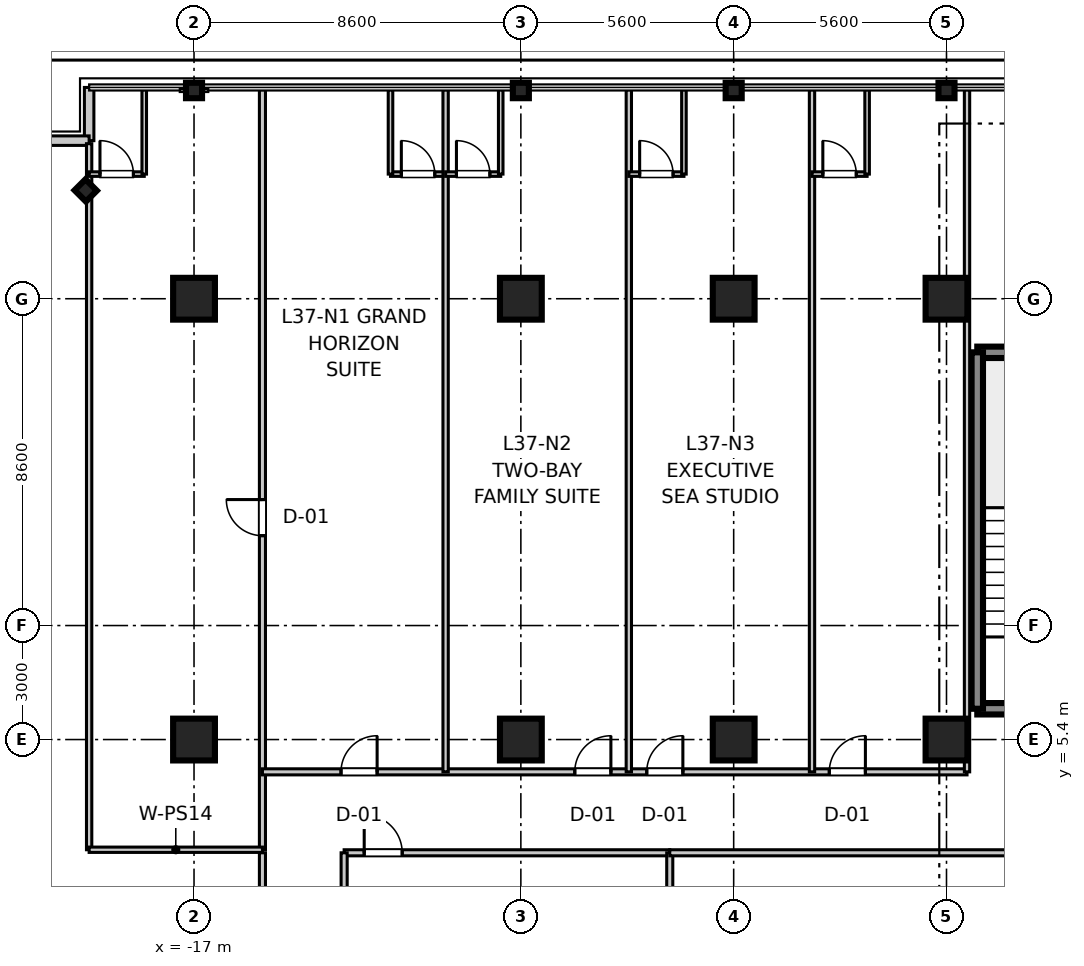
"""IFC4 building model, lengths in metres.
Left out: names, types, materials, properties, quantities, classifications, styles, units other than length and angle.
Written with IfcOpenShell. Run it as: python <this file> out.ifc"""

import sys

from ifc_helpers import new_model, si_unit, direction, frame, frame_2d, origin, origin_2d, place, context, subcontext, project, spatial, rectangle, i_section, extrude, source, transform, mapped, element, fill, save


model = new_model("IFC4")
c1 = context("Model", 3, precision=1e-05, world=origin(), true_north=direction((0.0, 1.0)))
c2 = subcontext(c1, "Body", "Model", "MODEL_VIEW")
j1 = project(units=[si_unit("LENGTHUNIT", "METRE"), si_unit("PLANEANGLEUNIT", "RADIAN")], contexts=[c1])
p1 = place(None, origin())
s1 = spatial("IfcSite", under=j1, at=p1, CompositionType="ELEMENT")
p2 = place(p1, origin())
s2 = spatial("IfcBuilding", under=s1, at=p2, CompositionType="ELEMENT")
p3 = place(p2, frame((0.0, 0.0, 149.0)))
s3 = spatial("IfcBuildingStorey", under=s2, at=p3, CompositionType="ELEMENT", Elevation=149.0)
m1 = source(origin(), c2, "Body", "SweptSolid", [
    extrude(rectangle(XDim=1.1, YDim=1.1, at=origin_2d()), origin(), (0.0, 0.0, 1.0), 3.605),
])
for number, where, z_axis, x_axis in (
    (1, (-17.0, 5.4, 0.0), (0.0, 0.0, 1.0), (1.0, 0.0, 0.0)),
    (2, (-17.0, 17.0, 0.0), (0.0, 0.0, 1.0), (1.0, 0.0, 0.0)),
    (3, (-8.4, 5.4, 0.0), (0.0, 0.0, 1.0), (1.0, 0.0, 0.0)),
    (4, (-8.4, 17.0, 0.0), (0.0, 0.0, 1.0), (1.0, 0.0, 0.0)),
    (5, (-2.8, 5.4, 0.0), (0.0, 0.0, 1.0), (1.0, 0.0, 0.0)),
    (6, (-2.8, 17.0, 0.0), (0.0, 0.0, 1.0), (1.0, 0.0, 0.0)),
    (7, (2.8, 5.4, 0.0), (0.0, 0.0, 1.0), (1.0, 0.0, 0.0)),
    (8, (2.8, 17.0, 0.0), (0.0, 0.0, 1.0), (1.0, 0.0, 0.0)),
):
    element("IfcColumn", number, at=place(p3, frame(where, z_axis=z_axis, x_axis=x_axis)), inside=s3, PredefinedType="COLUMN", context=c2, shape_type="MappedRepresentation", body=[
        mapped(m1, transform((0.0, 0.0, 0.0), scale=1.0)),
    ])
m2 = source(origin(), c2, "Body", "SweptSolid", [
    extrude(i_section(OverallWidth=0.406, OverallDepth=0.422, WebThickness=0.019, FlangeThickness=0.03, at=origin_2d()), origin(), (0.0, 0.0, 1.0), 3.605),
])
for number, where, z_axis, x_axis in (
    (9, (-17.0, 22.48, 0.0), (0.0, 0.0, 1.0), (0.0, 1.0, 0.0)),
    (10, (-8.4, 22.48, 0.0), (0.0, 0.0, 1.0), (0.0, 1.0, 0.0)),
    (11, (-2.8, 22.48, 0.0), (0.0, 0.0, 1.0), (0.0, 1.0, 0.0)),
    (12, (2.8, 22.48, 0.0), (0.0, 0.0, 1.0), (0.0, 1.0, 0.0)),
    (13, (-19.85, 19.85, 0.0), (0.0, 0.0, 1.0), (0.707, 0.707, 0.0)),
):
    element("IfcColumn", number, at=place(p3, frame(where, z_axis=z_axis, x_axis=x_axis)), inside=s3, PredefinedType="COLUMN", context=c2, shape_type="MappedRepresentation", body=[
        mapped(m2, transform((0.0, 0.0, 0.0), scale=1.0)),
    ])
m3 = source(origin(), c2, "Body", "SweptSolid", [
    extrude(rectangle(XDim=3.98, YDim=0.3, at=frame_2d((1.99, 0.0))), origin(), (0.0, 0.0, 1.0), 3.39),
])
for number, where, z_axis, x_axis in (
    (14, (3.61, 6.21, 0.0), (0.0, 0.0, 1.0), (1.0, 0.0, 0.0)),
    (15, (3.61, 15.59, 0.0), (0.0, 0.0, 1.0), (1.0, 0.0, 0.0)),
):
    element("IfcWall", number, at=place(p3, frame(where, z_axis=z_axis, x_axis=x_axis)), inside=s3, PredefinedType="SHEAR", context=c2, shape_type="MappedRepresentation", body=[
        mapped(m3, transform((0.0, 0.0, 0.0), scale=1.0)),
    ])
m4 = source(origin(), c2, "Body", "SweptSolid", [
    extrude(rectangle(XDim=9.38, YDim=0.3, at=frame_2d((4.69, 0.0))), origin(), (0.0, 0.0, 1.0), 3.39),
])
p4 = place(p3, frame((3.61, 6.21, 0.0), z_axis=(0.0, 0.0, 1.0), x_axis=(0.0, 1.0, 0.0)))
e16 = element("IfcWall", 16, at=p4, inside=s3, PredefinedType="SHEAR", context=c2, shape_type="MappedRepresentation", body=[
    mapped(m4, transform((0.0, 0.0, 0.0), scale=1.0)),
])
m5 = source(origin(), c2, "Body", "SweptSolid", [
    extrude(rectangle(XDim=1.4, YDim=0.25, at=frame_2d((0.7, 0.0))), origin(), (0.0, 0.0, 1.0), 3.39),
])
p5 = place(p3, frame((-19.76, 21.16, 0.0), z_axis=(0.0, 0.0, 1.0), x_axis=(0.0, 1.0, 0.0)))
e17 = element("IfcWall", 17, at=p5, inside=s3, PredefinedType="STANDARD", context=c2, shape_type="MappedRepresentation", body=[
    mapped(m5, transform((0.0, 0.0, 0.0), scale=1.0)),
])
m6 = source(origin(), c2, "Body", "SweptSolid", [
    extrude(rectangle(XDim=1.4, YDim=0.25, at=frame_2d((0.7, 0.0))), origin(), (0.0, 0.0, 1.0), 3.39),
])
p6 = place(p3, frame((-21.16, 21.16, 0.0), z_axis=(0.0, 0.0, 1.0), x_axis=(1.0, 0.0, 0.0)))
e18 = element("IfcWall", 18, at=p6, inside=s3, PredefinedType="STANDARD", context=c2, shape_type="MappedRepresentation", body=[
    mapped(m6, transform((0.0, 0.0, 0.0), scale=1.0)),
])
m7 = source(origin(), c2, "Body", "SweptSolid", [
    extrude(rectangle(XDim=20.0, YDim=0.16, at=frame_2d((10.0, 0.0))), origin(), (0.0, 0.0, 1.0), 2.73),
])
p7 = place(p3, frame((-15.2, 2.5, 0.0), z_axis=(0.0, 0.0, 1.0), x_axis=(0.0, 1.0, 0.0)))
e19 = element("IfcWall", 19, at=p7, inside=s3, PredefinedType="PARTITIONING", context=c2, shape_type="MappedRepresentation", body=[
    mapped(m7, transform((0.0, 0.0, 0.0), scale=1.0)),
])
p8 = place(p7, frame((8.265, 0.0, 0.0)))
e20 = element("IfcOpeningElement", 20, at=p8, cuts=e19, PredefinedType="OPENING", context=c2, shape_type="SweptSolid", body=[
    extrude(rectangle(XDim=0.95, YDim=2.1, at=frame_2d((0.475, 1.05))), frame((0.0, 0.09, 0.0), z_axis=(0.0, -1.0, 0.0), x_axis=(1.0, 0.0, 0.0)), (0.0, 0.0, 1.0), 0.18),
])
m8 = source(origin(), c2, "Body", "SweptSolid", [
    extrude(rectangle(XDim=18.58, YDim=0.14, at=frame_2d((9.29, 0.0))), origin(), (0.0, 0.0, 1.0), 2.73),
])
p9 = place(p3, frame((-19.76, 2.5, 0.0), z_axis=(0.0, 0.0, 1.0), x_axis=(0.0, 1.0, 0.0)))
e21 = element("IfcWall", 21, at=p9, inside=s3, PredefinedType="PARTITIONING", context=c2, shape_type="MappedRepresentation", body=[
    mapped(m8, transform((0.0, 0.0, 0.0), scale=1.0)),
])
m9 = source(origin(), c2, "Body", "SweptSolid", [
    extrude(rectangle(XDim=4.56, YDim=0.14, at=frame_2d((2.28, 0.0))), origin(), (0.0, 0.0, 1.0), 2.73),
])
p10 = place(p3, frame((-19.76, 2.5, 0.0), z_axis=(0.0, 0.0, 1.0), x_axis=(1.0, 0.0, 0.0)))
e22 = element("IfcWall", 22, at=p10, inside=s3, PredefinedType="PARTITIONING", context=c2, shape_type="MappedRepresentation", body=[
    mapped(m9, transform((0.0, 0.0, 0.0), scale=1.0)),
])
m10 = source(origin(), c2, "Body", "SweptSolid", [
    extrude(rectangle(XDim=1.45, YDim=0.12, at=frame_2d((0.725, 0.0))), origin(), (0.0, 0.0, 1.0), 2.73),
])
p11 = place(p3, frame((-19.76, 20.28, 0.0), z_axis=(0.0, 0.0, 1.0), x_axis=(1.0, 0.0, 0.0)))
e23 = element("IfcWall", 23, at=p11, inside=s3, PredefinedType="PARTITIONING", context=c2, shape_type="MappedRepresentation", body=[
    mapped(m10, transform((0.0, 0.0, 0.0), scale=1.0)),
])
p12 = place(p11, frame((0.285, 0.0, 0.0)))
e24 = element("IfcOpeningElement", 24, at=p12, cuts=e23, PredefinedType="OPENING", context=c2, shape_type="SweptSolid", body=[
    extrude(rectangle(XDim=0.88, YDim=2.1, at=frame_2d((0.44, 1.05))), frame((0.0, 0.07, 0.0), z_axis=(0.0, -1.0, 0.0), x_axis=(1.0, 0.0, 0.0)), (0.0, 0.0, 1.0), 0.14),
])
m11 = source(origin(), c2, "Body", "SweptSolid", [
    extrude(rectangle(XDim=2.22, YDim=0.12, at=frame_2d((1.11, 0.0))), origin(), (0.0, 0.0, 1.0), 2.73),
])
p13 = place(p3, frame((-18.31, 20.28, 0.0), z_axis=(0.0, 0.0, 1.0), x_axis=(0.0, 1.0, 0.0)))
e25 = element("IfcWall", 25, at=p13, inside=s3, PredefinedType="PARTITIONING", context=c2, shape_type="MappedRepresentation", body=[
    mapped(m11, transform((0.0, 0.0, 0.0), scale=1.0)),
])
m12 = source(origin(), c2, "Body", "SweptSolid", [
    extrude(rectangle(XDim=18.54, YDim=0.16, at=frame_2d((9.27, 0.0))), origin(), (0.0, 0.0, 1.0), 2.73),
])
p14 = place(p3, frame((-15.2, 4.55, 0.0), z_axis=(0.0, 0.0, 1.0), x_axis=(1.0, 0.0, 0.0)))
e26 = element("IfcWall", 26, at=p14, inside=s3, PredefinedType="PARTITIONING", context=c2, shape_type="MappedRepresentation", body=[
    mapped(m12, transform((0.0, 0.0, 0.0), scale=1.0)),
])
p15 = place(p14, frame((2.068, 0.0, 0.0)))
e27 = element("IfcOpeningElement", 27, at=p15, cuts=e26, PredefinedType="OPENING", context=c2, shape_type="SweptSolid", body=[
    extrude(rectangle(XDim=0.95, YDim=2.1, at=frame_2d((0.475, 1.05))), frame((0.0, 0.09, 0.0), z_axis=(0.0, -1.0, 0.0), x_axis=(1.0, 0.0, 0.0)), (0.0, 0.0, 1.0), 0.18),
])
p16 = place(p14, frame((8.219, 0.0, 0.0)))
e28 = element("IfcOpeningElement", 28, at=p16, cuts=e26, PredefinedType="OPENING", context=c2, shape_type="SweptSolid", body=[
    extrude(rectangle(XDim=0.95, YDim=2.1, at=frame_2d((0.475, 1.05))), frame((0.0, 0.09, 0.0), z_axis=(0.0, -1.0, 0.0), x_axis=(1.0, 0.0, 0.0)), (0.0, 0.0, 1.0), 0.18),
])
p17 = place(p14, frame((10.113, 0.0, 0.0)))
e29 = element("IfcOpeningElement", 29, at=p17, cuts=e26, PredefinedType="OPENING", context=c2, shape_type="SweptSolid", body=[
    extrude(rectangle(XDim=0.95, YDim=2.1, at=frame_2d((0.475, 1.05))), frame((0.0, 0.09, 0.0), z_axis=(0.0, -1.0, 0.0), x_axis=(1.0, 0.0, 0.0)), (0.0, 0.0, 1.0), 0.18),
])
p18 = place(p14, frame((14.916, 0.0, 0.0)))
e30 = element("IfcOpeningElement", 30, at=p18, cuts=e26, PredefinedType="OPENING", context=c2, shape_type="SweptSolid", body=[
    extrude(rectangle(XDim=0.95, YDim=2.1, at=frame_2d((0.475, 1.05))), frame((0.0, 0.09, 0.0), z_axis=(0.0, -1.0, 0.0), x_axis=(1.0, 0.0, 0.0)), (0.0, 0.0, 1.0), 0.18),
])
m13 = source(origin(), c2, "Body", "SweptSolid", [
    extrude(rectangle(XDim=17.95, YDim=0.14, at=frame_2d((8.975, 0.0))), origin(), (0.0, 0.0, 1.0), 2.73),
])
p19 = place(p3, frame((3.34, 4.55, 0.0), z_axis=(0.0, 0.0, 1.0), x_axis=(0.0, 1.0, 0.0)))
e31 = element("IfcWall", 31, at=p19, inside=s3, PredefinedType="PARTITIONING", context=c2, shape_type="MappedRepresentation", body=[
    mapped(m13, transform((0.0, 0.0, 0.0), scale=1.0)),
])
m14 = source(origin(), c2, "Body", "SweptSolid", [
    extrude(rectangle(XDim=1.45, YDim=0.12, at=frame_2d((0.725, 0.0))), origin(), (0.0, 0.0, 1.0), 2.73),
])
p20 = place(p3, frame((-11.83, 20.28, 0.0), z_axis=(0.0, 0.0, 1.0), x_axis=(1.0, 0.0, 0.0)))
e32 = element("IfcWall", 32, at=p20, inside=s3, PredefinedType="PARTITIONING", context=c2, shape_type="MappedRepresentation", body=[
    mapped(m14, transform((0.0, 0.0, 0.0), scale=1.0)),
])
p21 = place(p20, frame((0.285, 0.0, 0.0)))
e33 = element("IfcOpeningElement", 33, at=p21, cuts=e32, PredefinedType="OPENING", context=c2, shape_type="SweptSolid", body=[
    extrude(rectangle(XDim=0.88, YDim=2.1, at=frame_2d((0.44, 1.05))), frame((0.0, 0.07, 0.0), z_axis=(0.0, -1.0, 0.0), x_axis=(1.0, 0.0, 0.0)), (0.0, 0.0, 1.0), 0.14),
])
p22 = place(p3, frame((-11.83, 20.28, 0.0), z_axis=(0.0, 0.0, 1.0), x_axis=(0.0, 1.0, 0.0)))
e34 = element("IfcWall", 34, at=p22, inside=s3, PredefinedType="PARTITIONING", context=c2, shape_type="MappedRepresentation", body=[
    mapped(m11, transform((0.0, 0.0, 0.0), scale=1.0)),
])
p23 = place(p3, frame((-10.38, 4.55, 0.0), z_axis=(0.0, 0.0, 1.0), x_axis=(0.0, 1.0, 0.0)))
e35 = element("IfcWall", 35, at=p23, inside=s3, PredefinedType="PARTITIONING", context=c2, shape_type="MappedRepresentation", body=[
    mapped(m13, transform((0.0, 0.0, 0.0), scale=1.0)),
])
p24 = place(p3, frame((-10.38, 20.28, 0.0), z_axis=(0.0, 0.0, 1.0), x_axis=(1.0, 0.0, 0.0)))
e36 = element("IfcWall", 36, at=p24, inside=s3, PredefinedType="PARTITIONING", context=c2, shape_type="MappedRepresentation", body=[
    mapped(m10, transform((0.0, 0.0, 0.0), scale=1.0)),
])
p25 = place(p24, frame((0.285, 0.0, 0.0)))
e37 = element("IfcOpeningElement", 37, at=p25, cuts=e36, PredefinedType="OPENING", context=c2, shape_type="SweptSolid", body=[
    extrude(rectangle(XDim=0.88, YDim=2.1, at=frame_2d((0.44, 1.05))), frame((0.0, 0.07, 0.0), z_axis=(0.0, -1.0, 0.0), x_axis=(1.0, 0.0, 0.0)), (0.0, 0.0, 1.0), 0.14),
])
p26 = place(p3, frame((-8.93, 20.28, 0.0), z_axis=(0.0, 0.0, 1.0), x_axis=(0.0, 1.0, 0.0)))
e38 = element("IfcWall", 38, at=p26, inside=s3, PredefinedType="PARTITIONING", context=c2, shape_type="MappedRepresentation", body=[
    mapped(m11, transform((0.0, 0.0, 0.0), scale=1.0)),
])
p27 = place(p3, frame((-5.559, 4.55, 0.0), z_axis=(0.0, 0.0, 1.0), x_axis=(0.0, 1.0, 0.0)))
e39 = element("IfcWall", 39, at=p27, inside=s3, PredefinedType="PARTITIONING", context=c2, shape_type="MappedRepresentation", body=[
    mapped(m13, transform((0.0, 0.0, 0.0), scale=1.0)),
])
p28 = place(p3, frame((-5.559, 20.28, 0.0), z_axis=(0.0, 0.0, 1.0), x_axis=(1.0, 0.0, 0.0)))
e40 = element("IfcWall", 40, at=p28, inside=s3, PredefinedType="PARTITIONING", context=c2, shape_type="MappedRepresentation", body=[
    mapped(m14, transform((0.0, 0.0, 0.0), scale=1.0)),
])
p29 = place(p28, frame((0.285, 0.0, 0.0)))
e41 = element("IfcOpeningElement", 41, at=p29, cuts=e40, PredefinedType="OPENING", context=c2, shape_type="SweptSolid", body=[
    extrude(rectangle(XDim=0.88, YDim=2.1, at=frame_2d((0.44, 1.05))), frame((0.0, 0.07, 0.0), z_axis=(0.0, -1.0, 0.0), x_axis=(1.0, 0.0, 0.0)), (0.0, 0.0, 1.0), 0.14),
])
p30 = place(p3, frame((-4.109, 20.28, 0.0), z_axis=(0.0, 0.0, 1.0), x_axis=(0.0, 1.0, 0.0)))
e42 = element("IfcWall", 42, at=p30, inside=s3, PredefinedType="PARTITIONING", context=c2, shape_type="MappedRepresentation", body=[
    mapped(m11, transform((0.0, 0.0, 0.0), scale=1.0)),
])
p31 = place(p3, frame((-0.739, 4.55, 0.0), z_axis=(0.0, 0.0, 1.0), x_axis=(0.0, 1.0, 0.0)))
e43 = element("IfcWall", 43, at=p31, inside=s3, PredefinedType="PARTITIONING", context=c2, shape_type="MappedRepresentation", body=[
    mapped(m13, transform((0.0, 0.0, 0.0), scale=1.0)),
])
p32 = place(p3, frame((-0.739, 20.28, 0.0), z_axis=(0.0, 0.0, 1.0), x_axis=(1.0, 0.0, 0.0)))
e44 = element("IfcWall", 44, at=p32, inside=s3, PredefinedType="PARTITIONING", context=c2, shape_type="MappedRepresentation", body=[
    mapped(m10, transform((0.0, 0.0, 0.0), scale=1.0)),
])
p33 = place(p32, frame((0.285, 0.0, 0.0)))
e45 = element("IfcOpeningElement", 45, at=p33, cuts=e44, PredefinedType="OPENING", context=c2, shape_type="SweptSolid", body=[
    extrude(rectangle(XDim=0.88, YDim=2.1, at=frame_2d((0.44, 1.05))), frame((0.0, 0.07, 0.0), z_axis=(0.0, -1.0, 0.0), x_axis=(1.0, 0.0, 0.0)), (0.0, 0.0, 1.0), 0.14),
])
p34 = place(p3, frame((0.711, 20.28, 0.0), z_axis=(0.0, 0.0, 1.0), x_axis=(0.0, 1.0, 0.0)))
e46 = element("IfcWall", 46, at=p34, inside=s3, PredefinedType="PARTITIONING", context=c2, shape_type="MappedRepresentation", body=[
    mapped(m11, transform((0.0, 0.0, 0.0), scale=1.0)),
])
m15 = source(origin(), c2, "Body", "SweptSolid", [
    extrude(rectangle(XDim=4.84, YDim=0.16, at=frame_2d((2.42, 0.0))), origin(), (0.0, 0.0, 1.0), 2.73),
])
p35 = place(p3, frame((-15.2, -2.42, 0.0), z_axis=(0.0, 0.0, 1.0), x_axis=(0.0, 1.0, 0.0)))
e47 = element("IfcWall", 47, at=p35, inside=s3, PredefinedType="PARTITIONING", context=c2, shape_type="MappedRepresentation", body=[
    mapped(m15, transform((0.0, 0.0, 0.0), scale=1.0)),
])
p36 = place(p35, frame((1.945, 0.0, 0.0)))
e48 = element("IfcOpeningElement", 48, at=p36, cuts=e47, PredefinedType="OPENING", context=c2, shape_type="SweptSolid", body=[
    extrude(rectangle(XDim=0.95, YDim=2.1, at=frame_2d((0.475, 1.05))), frame((0.0, 0.09, 0.0), z_axis=(0.0, -1.0, 0.0), x_axis=(1.0, 0.0, 0.0)), (0.0, 0.0, 1.0), 0.18),
])
m16 = source(origin(), c2, "Body", "SweptSolid", [
    extrude(rectangle(XDim=8.568, YDim=0.16, at=frame_2d((4.284, 0.0))), origin(), (0.0, 0.0, 1.0), 2.73),
])
p37 = place(p3, frame((-13.05, 2.42, 0.0), z_axis=(0.0, 0.0, 1.0), x_axis=(1.0, 0.0, 0.0)))
e49 = element("IfcWall", 49, at=p37, inside=s3, PredefinedType="PARTITIONING", context=c2, shape_type="MappedRepresentation", body=[
    mapped(m16, transform((0.0, 0.0, 0.0), scale=1.0)),
])
p38 = place(p37, frame((0.528, 0.0, 0.0)))
e50 = element("IfcOpeningElement", 50, at=p38, cuts=e49, PredefinedType="OPENING", context=c2, shape_type="SweptSolid", body=[
    extrude(rectangle(XDim=1.0, YDim=2.1, at=frame_2d((0.5, 1.05))), frame((0.0, 0.09, 0.0), z_axis=(0.0, -1.0, 0.0), x_axis=(1.0, 0.0, 0.0)), (0.0, 0.0, 1.0), 0.18),
])
for number, where, z_axis, x_axis in (
    (51, (-13.05, -2.42, 0.0), (0.0, 0.0, 1.0), (0.0, 1.0, 0.0)),
    (52, (-4.482, -2.42, 0.0), (0.0, 0.0, 1.0), (0.0, 1.0, 0.0)),
):
    element("IfcWall", number, at=place(p3, frame(where, z_axis=z_axis, x_axis=x_axis)), inside=s3, PredefinedType="PARTITIONING", context=c2, shape_type="MappedRepresentation", body=[
        mapped(m15, transform((0.0, 0.0, 0.0), scale=1.0)),
    ])
m17 = source(origin(), c2, "Body", "SweptSolid", [
    extrude(rectangle(XDim=11.832, YDim=0.16, at=frame_2d((5.916, 0.0))), origin(), (0.0, 0.0, 1.0), 2.73),
])
p39 = place(p3, frame((-4.482, 2.42, 0.0), z_axis=(0.0, 0.0, 1.0), x_axis=(1.0, 0.0, 0.0)))
e53 = element("IfcWall", 53, at=p39, inside=s3, PredefinedType="PARTITIONING", context=c2, shape_type="MappedRepresentation", body=[
    mapped(m17, transform((0.0, 0.0, 0.0), scale=1.0)),
])
m18 = source(origin(), c2, "Body", "SweptSolid", [
    extrude(rectangle(XDim=0.88, YDim=2.1, at=frame_2d((0.44, 1.05))), frame((0.0, 0.025, 0.0), z_axis=(0.0, -1.0, 0.0), x_axis=(1.0, 0.0, 0.0)), (0.0, 0.0, 1.0), 0.05),
])
p40 = place(p12, origin())
e54 = element("IfcDoor", 54, at=p40, inside=s3, OperationType="SINGLE_SWING_LEFT", PredefinedType="DOOR", context=c2, shape_type="MappedRepresentation", body=[
    mapped(m18, transform((0.0, 0.0, 0.0), scale=1.0)),
])
fill(e24, e54)
m19 = source(origin(), c2, "Body", "SweptSolid", [
    extrude(rectangle(XDim=0.95, YDim=2.1, at=frame_2d((0.475, 1.05))), frame((0.0, 0.025, 0.0), z_axis=(0.0, -1.0, 0.0), x_axis=(1.0, 0.0, 0.0)), (0.0, 0.0, 1.0), 0.05),
])
p41 = place(p8, origin())
e55 = element("IfcDoor", 55, at=p41, inside=s3, OperationType="SINGLE_SWING_RIGHT", PredefinedType="DOOR", context=c2, shape_type="MappedRepresentation", body=[
    mapped(m19, transform((0.0, 0.0, 0.0), scale=1.0)),
])
fill(e20, e55)
p42 = place(p21, origin())
e56 = element("IfcDoor", 56, at=p42, inside=s3, OperationType="SINGLE_SWING_LEFT", PredefinedType="DOOR", context=c2, shape_type="MappedRepresentation", body=[
    mapped(m18, transform((0.0, 0.0, 0.0), scale=1.0)),
])
fill(e33, e56)
p43 = place(p15, origin())
e57 = element("IfcDoor", 57, at=p43, inside=s3, OperationType="SINGLE_SWING_RIGHT", PredefinedType="DOOR", context=c2, shape_type="MappedRepresentation", body=[
    mapped(m19, transform((0.0, 0.0, 0.0), scale=1.0)),
])
fill(e27, e57)
p44 = place(p25, origin())
e58 = element("IfcDoor", 58, at=p44, inside=s3, OperationType="SINGLE_SWING_LEFT", PredefinedType="DOOR", context=c2, shape_type="MappedRepresentation", body=[
    mapped(m18, transform((0.0, 0.0, 0.0), scale=1.0)),
])
fill(e37, e58)
p45 = place(p16, origin())
e59 = element("IfcDoor", 59, at=p45, inside=s3, OperationType="SINGLE_SWING_RIGHT", PredefinedType="DOOR", context=c2, shape_type="MappedRepresentation", body=[
    mapped(m19, transform((0.0, 0.0, 0.0), scale=1.0)),
])
fill(e28, e59)
p46 = place(p29, origin())
e60 = element("IfcDoor", 60, at=p46, inside=s3, OperationType="SINGLE_SWING_LEFT", PredefinedType="DOOR", context=c2, shape_type="MappedRepresentation", body=[
    mapped(m18, transform((0.0, 0.0, 0.0), scale=1.0)),
])
fill(e41, e60)
p47 = place(p17, origin())
e61 = element("IfcDoor", 61, at=p47, inside=s3, OperationType="SINGLE_SWING_RIGHT", PredefinedType="DOOR", context=c2, shape_type="MappedRepresentation", body=[
    mapped(m19, transform((0.0, 0.0, 0.0), scale=1.0)),
])
fill(e29, e61)
p48 = place(p33, origin())
e62 = element("IfcDoor", 62, at=p48, inside=s3, OperationType="SINGLE_SWING_LEFT", PredefinedType="DOOR", context=c2, shape_type="MappedRepresentation", body=[
    mapped(m18, transform((0.0, 0.0, 0.0), scale=1.0)),
])
fill(e45, e62)
p49 = place(p18, origin())
e63 = element("IfcDoor", 63, at=p49, inside=s3, OperationType="SINGLE_SWING_RIGHT", PredefinedType="DOOR", context=c2, shape_type="MappedRepresentation", body=[
    mapped(m19, transform((0.0, 0.0, 0.0), scale=1.0)),
])
fill(e30, e63)
m20 = source(origin(), c2, "Body", "SweptSolid", [
    extrude(rectangle(XDim=1.0, YDim=2.1, at=frame_2d((0.5, 1.05))), frame((0.0, 0.025, 0.0), z_axis=(0.0, -1.0, 0.0), x_axis=(1.0, 0.0, 0.0)), (0.0, 0.0, 1.0), 0.05),
])
p50 = place(p38, frame((1.0, 0.0, 0.0), z_axis=(0.0, 0.0, 1.0), x_axis=(-1.0, 0.0, 0.0)))
e64 = element("IfcDoor", 64, at=p50, inside=s3, OperationType="SINGLE_SWING_LEFT", PredefinedType="DOOR", context=c2, shape_type="MappedRepresentation", body=[
    mapped(m20, transform((0.0, 0.0, 0.0), scale=1.0)),
])
fill(e50, e64)
save(model, sys.argv[1])
